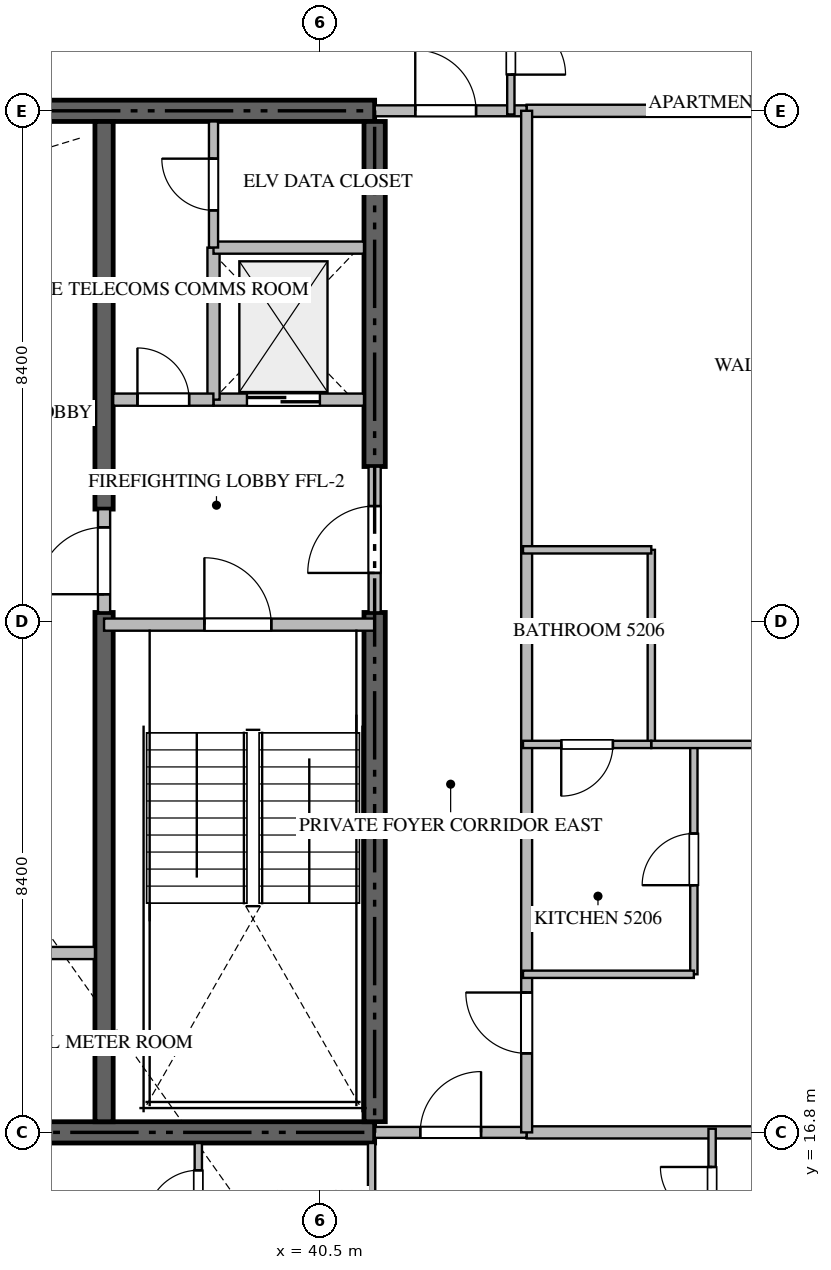
"""IFC4 building model, lengths in metres.
Left out: names, types, materials, properties, quantities, classifications, styles, units other than length and angle.
Written with IfcOpenShell. Run it as: python <this file> out.ifc"""

import sys

from ifc_helpers import new_model, si_unit, direction, frame, frame_2d, origin, place, context, subcontext, project, spatial, rectangle, extrude, source, transform, mapped, element, fill, save


model = new_model("IFC4")
c1 = context("Model", 3, precision=1e-05, world=origin(), true_north=direction((0.0, 1.0)))
c2 = subcontext(c1, "Body", "Model", "MODEL_VIEW")
j1 = project(units=[si_unit("LENGTHUNIT", "METRE"), si_unit("PLANEANGLEUNIT", "RADIAN")], contexts=[c1])
p1 = place(None, origin())
s1 = spatial("IfcSite", under=j1, at=p1, CompositionType="ELEMENT")
p2 = place(p1, origin())
s2 = spatial("IfcBuilding", under=s1, at=p2, CompositionType="ELEMENT")
p3 = place(p2, frame((0.0, 0.0, 210.45)))
s3 = spatial("IfcBuildingStorey", under=s2, at=p3, CompositionType="ELEMENT", Elevation=210.45)
for number, where, z_axis, x_axis in (
    (1, (23.4, 16.8, -0.44), (0.0, 0.0, 1.0), (1.0, 0.0, 0.0)),
    (2, (41.4, 33.6, -0.44), (0.0, 0.0, 1.0), (-1.0, 0.0, 0.0)),
):
    element("IfcWall", number, at=place(p3, frame(where, z_axis=z_axis, x_axis=x_axis)), inside=s3, PredefinedType="SHEAR", context=c2, shape_type="SweptSolid", body=[
        extrude(rectangle(XDim=18.0, YDim=0.35, at=frame_2d((9.0, 0.0))), origin(), (0.0, 0.0, 1.0), 4.028),
    ])
p4 = place(p3, frame((41.4, 16.975, -0.44), z_axis=(0.0, 0.0, 1.0), x_axis=(0.0, 1.0, 0.0)))
e3 = element("IfcWall", 3, at=p4, inside=s3, PredefinedType="SHEAR", context=c2, shape_type="SweptSolid", body=[
    extrude(rectangle(XDim=8.375, YDim=0.35, at=frame_2d((4.188, 0.0))), origin(), (0.0, 0.0, 1.0), 4.028),
])
p5 = place(p3, frame((41.4, 27.75, -0.44), z_axis=(0.0, 0.0, 1.0), x_axis=(0.0, 1.0, 0.0)))
e4 = element("IfcWall", 4, at=p5, inside=s3, PredefinedType="SHEAR", context=c2, shape_type="SweptSolid", body=[
    extrude(rectangle(XDim=5.675, YDim=0.35, at=frame_2d((2.837, 0.0))), origin(), (0.0, 0.0, 1.0), 4.028),
])
p6 = place(p3, frame((36.95, 16.975, -0.44), z_axis=(0.0, 0.0, 1.0), x_axis=(0.0, 1.0, 0.0)))
e5 = element("IfcWall", 5, at=p6, inside=s3, PredefinedType="SHEAR", context=c2, shape_type="SweptSolid", body=[
    extrude(rectangle(XDim=8.375, YDim=0.3, at=frame_2d((4.188, 0.0))), origin(), (0.0, 0.0, 1.0), 4.028),
])
p7 = place(p3, frame((36.95, 27.05, -0.44), z_axis=(0.0, 0.0, 1.0), x_axis=(0.0, 1.0, 0.0)))
e6 = element("IfcWall", 6, at=p7, inside=s3, PredefinedType="SHEAR", context=c2, shape_type="SweptSolid", body=[
    extrude(rectangle(XDim=6.375, YDim=0.3, at=frame_2d((3.188, 0.0))), origin(), (0.0, 0.0, 1.0), 4.028),
])
p8 = place(p3, frame((36.95, 25.15, 0.0), z_axis=(0.0, 0.0, 1.0), x_axis=(1.0, 0.0, 0.0)))
e7 = element("IfcWall", 7, at=p8, inside=s3, PredefinedType="STANDARD", context=c2, shape_type="SweptSolid", body=[
    extrude(rectangle(XDim=4.45, YDim=0.2, at=frame_2d((2.225, 0.0))), origin(), (0.0, 0.0, 1.0), 3.59),
])
p9 = place(p8, frame((1.65, 0.0, 0.0)))
e8 = element("IfcOpeningElement", 8, at=p9, cuts=e7, PredefinedType="OPENING", context=c2, shape_type="SweptSolid", body=[
    extrude(rectangle(XDim=1.1, YDim=2.15, at=frame_2d((0.55, 1.075))), frame((0.0, 0.11, 0.0), z_axis=(0.0, -1.0, 0.0), x_axis=(1.0, 0.0, 0.0)), (0.0, 0.0, 1.0), 0.22),
])
p10 = place(p3, frame((38.75, 28.85, 0.0), z_axis=(0.0, 0.0, 1.0), x_axis=(1.0, 0.0, 0.0)))
e9 = element("IfcWall", 9, at=p10, inside=s3, PredefinedType="STANDARD", context=c2, shape_type="SweptSolid", body=[
    extrude(rectangle(XDim=2.475, YDim=0.2, at=frame_2d((1.238, 0.0))), origin(), (0.0, 0.0, 1.0), 3.59),
])
p11 = place(p10, frame((0.55, 0.0, 0.0)))
e10 = element("IfcOpeningElement", 10, at=p11, cuts=e9, PredefinedType="OPENING", context=c2, shape_type="SweptSolid", body=[
    extrude(rectangle(XDim=1.2, YDim=2.2, at=frame_2d((0.6, 1.1))), frame((0.0, 0.11, 0.0), z_axis=(0.0, -1.0, 0.0), x_axis=(1.0, 0.0, 0.0)), (0.0, 0.0, 1.0), 0.22),
])
p12 = place(p3, frame((35.0, 30.65, 0.0), z_axis=(0.0, 0.0, 1.0), x_axis=(1.0, 0.0, 0.0)))
e11 = element("IfcWall", 11, at=p12, inside=s3, PredefinedType="STANDARD", context=c2, shape_type="SweptSolid", body=[
    extrude(rectangle(XDim=1.8, YDim=0.2, at=frame_2d((0.9, 0.0))), origin(), (0.0, 0.0, 1.0), 3.59),
])
p13 = place(p3, frame((38.75, 28.85, 0.0), z_axis=(0.0, 0.0, 1.0), x_axis=(0.0, 1.0, 0.0)))
e12 = element("IfcWall", 12, at=p13, inside=s3, PredefinedType="STANDARD", context=c2, shape_type="SweptSolid", body=[
    extrude(rectangle(XDim=2.5, YDim=0.2, at=frame_2d((1.25, 0.0))), origin(), (0.0, 0.0, 1.0), 3.59),
])
p14 = place(p3, frame((38.75, 31.35, 0.0), z_axis=(0.0, 0.0, 1.0), x_axis=(1.0, 0.0, 0.0)))
e13 = element("IfcWall", 13, at=p14, inside=s3, PredefinedType="STANDARD", context=c2, shape_type="SweptSolid", body=[
    extrude(rectangle(XDim=2.475, YDim=0.2, at=frame_2d((1.238, 0.0))), origin(), (0.0, 0.0, 1.0), 3.59),
])
p15 = place(p3, frame((37.1, 28.85, 0.0), z_axis=(0.0, 0.0, 1.0), x_axis=(1.0, 0.0, 0.0)))
e14 = element("IfcWall", 14, at=p15, inside=s3, PredefinedType="STANDARD", context=c2, shape_type="SweptSolid", body=[
    extrude(rectangle(XDim=1.648, YDim=0.2, at=frame_2d((0.824, 0.0))), origin(), (0.0, 0.0, 1.0), 3.59),
])
p16 = place(p15, frame((0.399, 0.0, 0.0)))
e15 = element("IfcOpeningElement", 15, at=p16, cuts=e14, PredefinedType="OPENING", context=c2, shape_type="SweptSolid", body=[
    extrude(rectangle(XDim=0.85, YDim=2.1, at=frame_2d((0.425, 1.05))), frame((0.0, 0.11, 0.0), z_axis=(0.0, -1.0, 0.0), x_axis=(1.0, 0.0, 0.0)), (0.0, 0.0, 1.0), 0.22),
])
p17 = place(p3, frame((41.4, 25.352, 0.0), z_axis=(0.0, 0.0, 1.0), x_axis=(0.0, 1.0, 0.0)))
e16 = element("IfcWall", 16, at=p17, inside=s3, PredefinedType="STANDARD", context=c2, shape_type="SweptSolid", body=[
    extrude(rectangle(XDim=2.396, YDim=0.2, at=frame_2d((1.198, 0.0))), origin(), (0.0, 0.0, 1.0), 3.59),
])
p18 = place(p17, frame((0.648, 0.0, 0.0)))
e17 = element("IfcOpeningElement", 17, at=p18, cuts=e16, PredefinedType="OPENING", context=c2, shape_type="SweptSolid", body=[
    extrude(rectangle(XDim=1.1, YDim=2.15, at=frame_2d((0.55, 1.075))), frame((0.0, 0.11, 0.0), z_axis=(0.0, -1.0, 0.0), x_axis=(1.0, 0.0, 0.0)), (0.0, 0.0, 1.0), 0.22),
])
p19 = place(p3, frame((36.95, 25.352, 0.0), z_axis=(0.0, 0.0, 1.0), x_axis=(0.0, 1.0, 0.0)))
e18 = element("IfcWall", 18, at=p19, inside=s3, PredefinedType="STANDARD", context=c2, shape_type="SweptSolid", body=[
    extrude(rectangle(XDim=1.696, YDim=0.2, at=frame_2d((0.848, 0.0))), origin(), (0.0, 0.0, 1.0), 3.59),
])
p20 = place(p19, frame((0.298, 0.0, 0.0)))
e19 = element("IfcOpeningElement", 19, at=p20, cuts=e18, PredefinedType="OPENING", context=c2, shape_type="SweptSolid", body=[
    extrude(rectangle(XDim=1.1, YDim=2.15, at=frame_2d((0.55, 1.075))), frame((0.0, 0.11, 0.0), z_axis=(0.0, -1.0, 0.0), x_axis=(1.0, 0.0, 0.0)), (0.0, 0.0, 1.0), 0.22),
])
p21 = place(p3, frame((38.75, 31.352, 0.0), z_axis=(0.0, 0.0, 1.0), x_axis=(0.0, 1.0, 0.0)))
e20 = element("IfcWall", 20, at=p21, inside=s3, PredefinedType="PARTITIONING", context=c2, shape_type="SweptSolid", body=[
    extrude(rectangle(XDim=2.073, YDim=0.15, at=frame_2d((1.037, 0.0))), origin(), (0.0, 0.0, 1.0), 3.59),
])
p22 = place(p21, frame((0.611, 0.0, 0.0)))
e21 = element("IfcOpeningElement", 21, at=p22, cuts=e20, PredefinedType="OPENING", context=c2, shape_type="SweptSolid", body=[
    extrude(rectangle(XDim=0.85, YDim=2.1, at=frame_2d((0.425, 1.05))), frame((0.0, 0.085, 0.0), z_axis=(0.0, -1.0, 0.0), x_axis=(1.0, 0.0, 0.0)), (0.0, 0.0, 1.0), 0.17),
])
p23 = place(p3, frame((31.902, 19.75, 0.0), z_axis=(0.0, 0.0, 1.0), x_axis=(1.0, 0.0, 0.0)))
e22 = element("IfcWall", 22, at=p23, inside=s3, PredefinedType="STANDARD", context=c2, shape_type="SweptSolid", body=[
    extrude(rectangle(XDim=4.898, YDim=0.2, at=frame_2d((2.449, 0.0))), origin(), (0.0, 0.0, 1.0), 3.59),
])
p24 = place(p23, frame((1.999, 0.0, 0.0)))
e23 = element("IfcOpeningElement", 23, at=p24, cuts=e22, PredefinedType="OPENING", context=c2, shape_type="SweptSolid", body=[
    extrude(rectangle(XDim=0.9, YDim=2.1, at=frame_2d((0.45, 1.05))), frame((0.0, 0.11, 0.0), z_axis=(0.0, -1.0, 0.0), x_axis=(1.0, 0.0, 0.0)), (0.0, 0.0, 1.0), 0.22),
])
for number, where, z_axis, x_axis in (
    (24, (43.9, 16.8, 0.0), (0.0, 0.0, 1.0), (1.0, 0.0, 0.0)),
    (25, (43.9, 33.6, 0.0), (0.0, 0.0, 1.0), (1.0, 0.0, 0.0)),
):
    element("IfcWall", number, at=place(p3, frame(where, z_axis=z_axis, x_axis=x_axis)), inside=s3, PredefinedType="PARTITIONING", context=c2, shape_type="SweptSolid", body=[
        extrude(rectangle(XDim=13.418, YDim=0.2, at=frame_2d((6.709, 0.0))), origin(), (0.0, 0.0, 1.0), 3.59),
    ])
p25 = place(p3, frame((41.402, 16.8, 0.0), z_axis=(0.0, 0.0, 1.0), x_axis=(1.0, 0.0, 0.0)))
e26 = element("IfcWall", 26, at=p25, inside=s3, PredefinedType="PARTITIONING", context=c2, shape_type="SweptSolid", body=[
    extrude(rectangle(XDim=2.496, YDim=0.18, at=frame_2d((1.248, 0.0))), origin(), (0.0, 0.0, 1.0), 3.59),
])
p26 = place(p25, frame((0.748, 0.0, 0.0)))
e27 = element("IfcOpeningElement", 27, at=p26, cuts=e26, PredefinedType="OPENING", context=c2, shape_type="SweptSolid", body=[
    extrude(rectangle(XDim=1.0, YDim=2.15, at=frame_2d((0.5, 1.075))), frame((0.0, 0.1, 0.0), z_axis=(0.0, -1.0, 0.0), x_axis=(1.0, 0.0, 0.0)), (0.0, 0.0, 1.0), 0.2),
])
p27 = place(p3, frame((41.402, 33.6, 0.0), z_axis=(0.0, 0.0, 1.0), x_axis=(1.0, 0.0, 0.0)))
e28 = element("IfcWall", 28, at=p27, inside=s3, PredefinedType="PARTITIONING", context=c2, shape_type="SweptSolid", body=[
    extrude(rectangle(XDim=2.496, YDim=0.18, at=frame_2d((1.248, 0.0))), origin(), (0.0, 0.0, 1.0), 3.59),
])
p28 = place(p27, frame((0.666, 0.0, 0.0)))
e29 = element("IfcOpeningElement", 29, at=p28, cuts=e28, PredefinedType="OPENING", context=c2, shape_type="SweptSolid", body=[
    extrude(rectangle(XDim=1.0, YDim=2.15, at=frame_2d((0.5, 1.075))), frame((0.0, 0.1, 0.0), z_axis=(0.0, -1.0, 0.0), x_axis=(1.0, 0.0, 0.0)), (0.0, 0.0, 1.0), 0.2),
])
p29 = place(p3, frame((43.9, 16.8, 0.0), z_axis=(0.0, 0.0, 1.0), x_axis=(0.0, 1.0, 0.0)))
e30 = element("IfcWall", 30, at=p29, inside=s3, PredefinedType="PARTITIONING", context=c2, shape_type="SweptSolid", body=[
    extrude(rectangle(XDim=16.8, YDim=0.18, at=frame_2d((8.4, 0.0))), origin(), (0.0, 0.0, 1.0), 3.59),
])
p30 = place(p29, frame((1.3, 0.0, 0.0)))
e31 = element("IfcOpeningElement", 31, at=p30, cuts=e30, PredefinedType="OPENING", context=c2, shape_type="SweptSolid", body=[
    extrude(rectangle(XDim=1.0, YDim=2.15, at=frame_2d((0.5, 1.075))), frame((0.0, 0.1, 0.0), z_axis=(0.0, -1.0, 0.0), x_axis=(1.0, 0.0, 0.0)), (0.0, 0.0, 1.0), 0.2),
])
p31 = place(p3, frame((41.35, 14.05, 0.0), z_axis=(0.0, 0.0, 1.0), x_axis=(0.0, 1.0, 0.0)))
e32 = element("IfcWall", 32, at=p31, inside=s3, PredefinedType="PARTITIONING", context=c2, shape_type="SweptSolid", body=[
    extrude(rectangle(XDim=2.575, YDim=0.12, at=frame_2d((1.288, 0.0))), origin(), (0.0, 0.0, 1.0), 3.59),
])
p32 = place(p3, frame((38.5, 14.752, 0.0), z_axis=(0.0, 0.0, 1.0), x_axis=(0.0, 1.0, 0.0)))
e33 = element("IfcWall", 33, at=p32, inside=s3, PredefinedType="PARTITIONING", context=c2, shape_type="SweptSolid", body=[
    extrude(rectangle(XDim=1.873, YDim=0.12, at=frame_2d((0.937, 0.0))), origin(), (0.0, 0.0, 1.0), 3.59),
])
p33 = place(p32, frame((0.575, 0.0, 0.0)))
e34 = element("IfcOpeningElement", 34, at=p33, cuts=e33, PredefinedType="OPENING", context=c2, shape_type="SweptSolid", body=[
    extrude(rectangle(XDim=0.85, YDim=2.1, at=frame_2d((0.425, 1.05))), frame((0.0, 0.07, 0.0), z_axis=(0.0, -1.0, 0.0), x_axis=(1.0, 0.0, 0.0)), (0.0, 0.0, 1.0), 0.14),
])
p34 = place(p3, frame((46.95, 14.752, 0.0), z_axis=(0.0, 0.0, 1.0), x_axis=(0.0, 1.0, 0.0)))
e35 = element("IfcWall", 35, at=p34, inside=s3, PredefinedType="PARTITIONING", context=c2, shape_type="SweptSolid", body=[
    extrude(rectangle(XDim=2.108, YDim=0.12, at=frame_2d((1.054, 0.0))), origin(), (0.0, 0.0, 1.0), 3.59),
])
p35 = place(p34, frame((0.629, 0.0, 0.0)))
e36 = element("IfcOpeningElement", 36, at=p35, cuts=e35, PredefinedType="OPENING", context=c2, shape_type="SweptSolid", body=[
    extrude(rectangle(XDim=0.85, YDim=2.1, at=frame_2d((0.425, 1.05))), frame((0.0, 0.07, 0.0), z_axis=(0.0, -1.0, 0.0), x_axis=(1.0, 0.0, 0.0)), (0.0, 0.0, 1.0), 0.14),
])
p36 = place(p3, frame((43.64, 35.75, 0.0), z_axis=(0.0, 0.0, 1.0), x_axis=(0.0, -1.0, 0.0)))
e37 = element("IfcWall", 37, at=p36, inside=s3, PredefinedType="PARTITIONING", context=c2, shape_type="SweptSolid", body=[
    extrude(rectangle(XDim=2.21, YDim=0.12, at=frame_2d((1.105, 0.0))), origin(), (0.0, 0.0, 1.0), 3.59),
])
p37 = place(p36, frame((0.655, 0.0, 0.0)))
e38 = element("IfcOpeningElement", 38, at=p37, cuts=e37, PredefinedType="OPENING", context=c2, shape_type="SweptSolid", body=[
    extrude(rectangle(XDim=0.9, YDim=2.1, at=frame_2d((0.45, 1.05))), frame((0.0, 0.07, 0.0), z_axis=(0.0, -1.0, 0.0), x_axis=(1.0, 0.0, 0.0)), (0.0, 0.0, 1.0), 0.14),
])
p38 = place(p3, frame((46.65, 19.4, 0.0), z_axis=(0.0, 0.0, 1.0), x_axis=(0.0, 1.0, 0.0)))
e39 = element("IfcWall", 39, at=p38, inside=s3, PredefinedType="PARTITIONING", context=c2, shape_type="SweptSolid", body=[
    extrude(rectangle(XDim=3.78, YDim=0.12, at=frame_2d((1.89, 0.0))), origin(), (0.0, 0.0, 1.0), 3.59),
])
p39 = place(p38, frame((1.465, 0.0, 0.0)))
e40 = element("IfcOpeningElement", 40, at=p39, cuts=e39, PredefinedType="OPENING", context=c2, shape_type="SweptSolid", body=[
    extrude(rectangle(XDim=0.85, YDim=2.1, at=frame_2d((0.425, 1.05))), frame((0.0, 0.07, 0.0), z_axis=(0.0, -1.0, 0.0), x_axis=(1.0, 0.0, 0.0)), (0.0, 0.0, 1.0), 0.14),
])
p40 = place(p3, frame((46.65, 19.4, 0.0), z_axis=(0.0, 0.0, 1.0), x_axis=(-1.0, 0.0, 0.0)))
e41 = element("IfcWall", 41, at=p40, inside=s3, PredefinedType="PARTITIONING", context=c2, shape_type="SweptSolid", body=[
    extrude(rectangle(XDim=2.81, YDim=0.12, at=frame_2d((1.405, 0.0))), origin(), (0.0, 0.0, 1.0), 3.59),
])
p41 = place(p3, frame((45.95, 23.18, 0.0), z_axis=(0.0, 0.0, 1.0), x_axis=(0.0, 1.0, 0.0)))
e42 = element("IfcWall", 42, at=p41, inside=s3, PredefinedType="PARTITIONING", context=c2, shape_type="SweptSolid", body=[
    extrude(rectangle(XDim=3.2, YDim=0.12, at=frame_2d((1.6, 0.0))), origin(), (0.0, 0.0, 1.0), 3.59),
])
p42 = place(p3, frame((45.95, 26.38, 0.0), z_axis=(0.0, 0.0, 1.0), x_axis=(-1.0, 0.0, 0.0)))
e43 = element("IfcWall", 43, at=p42, inside=s3, PredefinedType="PARTITIONING", context=c2, shape_type="SweptSolid", body=[
    extrude(rectangle(XDim=2.11, YDim=0.12, at=frame_2d((1.055, 0.0))), origin(), (0.0, 0.0, 1.0), 3.59),
])
p43 = place(p3, frame((53.214, 23.18, 0.0), z_axis=(0.0, 0.0, 1.0), x_axis=(-1.0, 0.0, 0.0)))
e44 = element("IfcWall", 44, at=p43, inside=s3, PredefinedType="PARTITIONING", context=c2, shape_type="SweptSolid", body=[
    extrude(rectangle(XDim=7.264, YDim=0.12, at=frame_2d((3.632, 0.0))), origin(), (0.0, 0.0, 1.0), 3.59),
])
p44 = place(p43, frame((3.207, 0.0, 0.0)))
e45 = element("IfcOpeningElement", 45, at=p44, cuts=e44, PredefinedType="OPENING", context=c2, shape_type="SweptSolid", body=[
    extrude(rectangle(XDim=0.85, YDim=2.1, at=frame_2d((0.425, 1.05))), frame((0.0, 0.07, 0.0), z_axis=(0.0, -1.0, 0.0), x_axis=(1.0, 0.0, 0.0)), (0.0, 0.0, 1.0), 0.14),
])
p45 = place(p3, frame((45.948, 23.18, 0.0), z_axis=(0.0, 0.0, 1.0), x_axis=(-1.0, 0.0, 0.0)))
e46 = element("IfcWall", 46, at=p45, inside=s3, PredefinedType="PARTITIONING", context=c2, shape_type="SweptSolid", body=[
    extrude(rectangle(XDim=2.108, YDim=0.12, at=frame_2d((1.054, 0.0))), origin(), (0.0, 0.0, 1.0), 3.59),
])
p46 = place(p45, frame((0.629, 0.0, 0.0)))
e47 = element("IfcOpeningElement", 47, at=p46, cuts=e46, PredefinedType="OPENING", context=c2, shape_type="SweptSolid", body=[
    extrude(rectangle(XDim=0.85, YDim=2.1, at=frame_2d((0.425, 1.05))), frame((0.0, 0.07, 0.0), z_axis=(0.0, -1.0, 0.0), x_axis=(1.0, 0.0, 0.0)), (0.0, 0.0, 1.0), 0.14),
])
m1 = source(origin(), c2, "Body", "SweptSolid", [
    extrude(rectangle(XDim=1.1, YDim=2.15, at=frame_2d((0.55, 1.075))), frame((0.0, 0.025, 0.0), z_axis=(0.0, -1.0, 0.0), x_axis=(1.0, 0.0, 0.0)), (0.0, 0.0, 1.0), 0.05),
])
p47 = place(p9, origin())
e48 = element("IfcDoor", 48, at=p47, inside=s3, OperationType="SINGLE_SWING_LEFT", PredefinedType="DOOR", context=c2, shape_type="MappedRepresentation", body=[
    mapped(m1, transform((0.0, 0.0, 0.0), scale=1.0)),
])
fill(e8, e48)
m2 = source(origin(), c2, "Body", "SweptSolid", [
    extrude(rectangle(XDim=1.2, YDim=2.2, at=frame_2d((0.6, 1.1))), frame((0.0, 0.025, 0.0), z_axis=(0.0, -1.0, 0.0), x_axis=(1.0, 0.0, 0.0)), (0.0, 0.0, 1.0), 0.05),
])
p48 = place(p11, origin())
e49 = element("IfcDoor", 49, at=p48, inside=s3, OperationType="DOUBLE_DOOR_SLIDING", PredefinedType="DOOR", context=c2, shape_type="MappedRepresentation", body=[
    mapped(m2, transform((0.0, 0.0, 0.0), scale=1.0)),
])
fill(e10, e49)
m3 = source(origin(), c2, "Body", "SweptSolid", [
    extrude(rectangle(XDim=0.85, YDim=2.1, at=frame_2d((0.425, 1.05))), frame((0.0, 0.025, 0.0), z_axis=(0.0, -1.0, 0.0), x_axis=(1.0, 0.0, 0.0)), (0.0, 0.0, 1.0), 0.05),
])
p49 = place(p16, origin())
e50 = element("IfcDoor", 50, at=p49, inside=s3, OperationType="SINGLE_SWING_LEFT", PredefinedType="DOOR", context=c2, shape_type="MappedRepresentation", body=[
    mapped(m3, transform((0.0, 0.0, 0.0), scale=1.0)),
])
fill(e15, e50)
p50 = place(p18, origin())
e51 = element("IfcDoor", 51, at=p50, inside=s3, OperationType="SINGLE_SWING_LEFT", PredefinedType="DOOR", context=c2, shape_type="MappedRepresentation", body=[
    mapped(m1, transform((0.0, 0.0, 0.0), scale=1.0)),
])
fill(e17, e51)
p51 = place(p20, origin())
e52 = element("IfcDoor", 52, at=p51, inside=s3, OperationType="SINGLE_SWING_LEFT", PredefinedType="DOOR", context=c2, shape_type="MappedRepresentation", body=[
    mapped(m1, transform((0.0, 0.0, 0.0), scale=1.0)),
])
fill(e19, e52)
p52 = place(p22, origin())
e53 = element("IfcDoor", 53, at=p52, inside=s3, OperationType="SINGLE_SWING_RIGHT", PredefinedType="DOOR", context=c2, shape_type="MappedRepresentation", body=[
    mapped(m3, transform((0.0, 0.0, 0.0), scale=1.0)),
])
fill(e21, e53)
m4 = source(origin(), c2, "Body", "SweptSolid", [
    extrude(rectangle(XDim=1.0, YDim=2.15, at=frame_2d((0.5, 1.075))), frame((0.0, 0.025, 0.0), z_axis=(0.0, -1.0, 0.0), x_axis=(1.0, 0.0, 0.0)), (0.0, 0.0, 1.0), 0.05),
])
p53 = place(p26, origin())
e54 = element("IfcDoor", 54, at=p53, inside=s3, OperationType="SINGLE_SWING_RIGHT", PredefinedType="DOOR", context=c2, shape_type="MappedRepresentation", body=[
    mapped(m4, transform((0.0, 0.0, 0.0), scale=1.0)),
])
fill(e27, e54)
p54 = place(p28, origin())
e55 = element("IfcDoor", 55, at=p54, inside=s3, OperationType="SINGLE_SWING_LEFT", PredefinedType="DOOR", context=c2, shape_type="MappedRepresentation", body=[
    mapped(m4, transform((0.0, 0.0, 0.0), scale=1.0)),
])
fill(e29, e55)
p55 = place(p30, origin())
e56 = element("IfcDoor", 56, at=p55, inside=s3, OperationType="SINGLE_SWING_RIGHT", PredefinedType="DOOR", context=c2, shape_type="MappedRepresentation", body=[
    mapped(m4, transform((0.0, 0.0, 0.0), scale=1.0)),
])
fill(e31, e56)
p56 = place(p33, origin())
e57 = element("IfcDoor", 57, at=p56, inside=s3, OperationType="SINGLE_SWING_LEFT", PredefinedType="DOOR", context=c2, shape_type="MappedRepresentation", body=[
    mapped(m3, transform((0.0, 0.0, 0.0), scale=1.0)),
])
fill(e34, e57)
p57 = place(p35, origin())
e58 = element("IfcDoor", 58, at=p57, inside=s3, OperationType="SINGLE_SWING_RIGHT", PredefinedType="DOOR", context=c2, shape_type="MappedRepresentation", body=[
    mapped(m3, transform((0.0, 0.0, 0.0), scale=1.0)),
])
fill(e36, e58)
m5 = source(origin(), c2, "Body", "SweptSolid", [
    extrude(rectangle(XDim=0.9, YDim=2.1, at=frame_2d((0.45, 1.05))), frame((0.0, 0.025, 0.0), z_axis=(0.0, -1.0, 0.0), x_axis=(1.0, 0.0, 0.0)), (0.0, 0.0, 1.0), 0.05),
])
p58 = place(p37, origin())
e59 = element("IfcDoor", 59, at=p58, inside=s3, OperationType="SINGLE_SWING_RIGHT", PredefinedType="DOOR", context=c2, shape_type="MappedRepresentation", body=[
    mapped(m5, transform((0.0, 0.0, 0.0), scale=1.0)),
])
fill(e38, e59)
p59 = place(p39, origin())
e60 = element("IfcDoor", 60, at=p59, inside=s3, OperationType="SINGLE_SWING_LEFT", PredefinedType="DOOR", context=c2, shape_type="MappedRepresentation", body=[
    mapped(m3, transform((0.0, 0.0, 0.0), scale=1.0)),
])
fill(e40, e60)
p60 = place(p46, origin())
e61 = element("IfcDoor", 61, at=p60, inside=s3, OperationType="SINGLE_SWING_RIGHT", PredefinedType="DOOR", context=c2, shape_type="MappedRepresentation", body=[
    mapped(m3, transform((0.0, 0.0, 0.0), scale=1.0)),
])
fill(e47, e61)
save(model, sys.argv[1])
